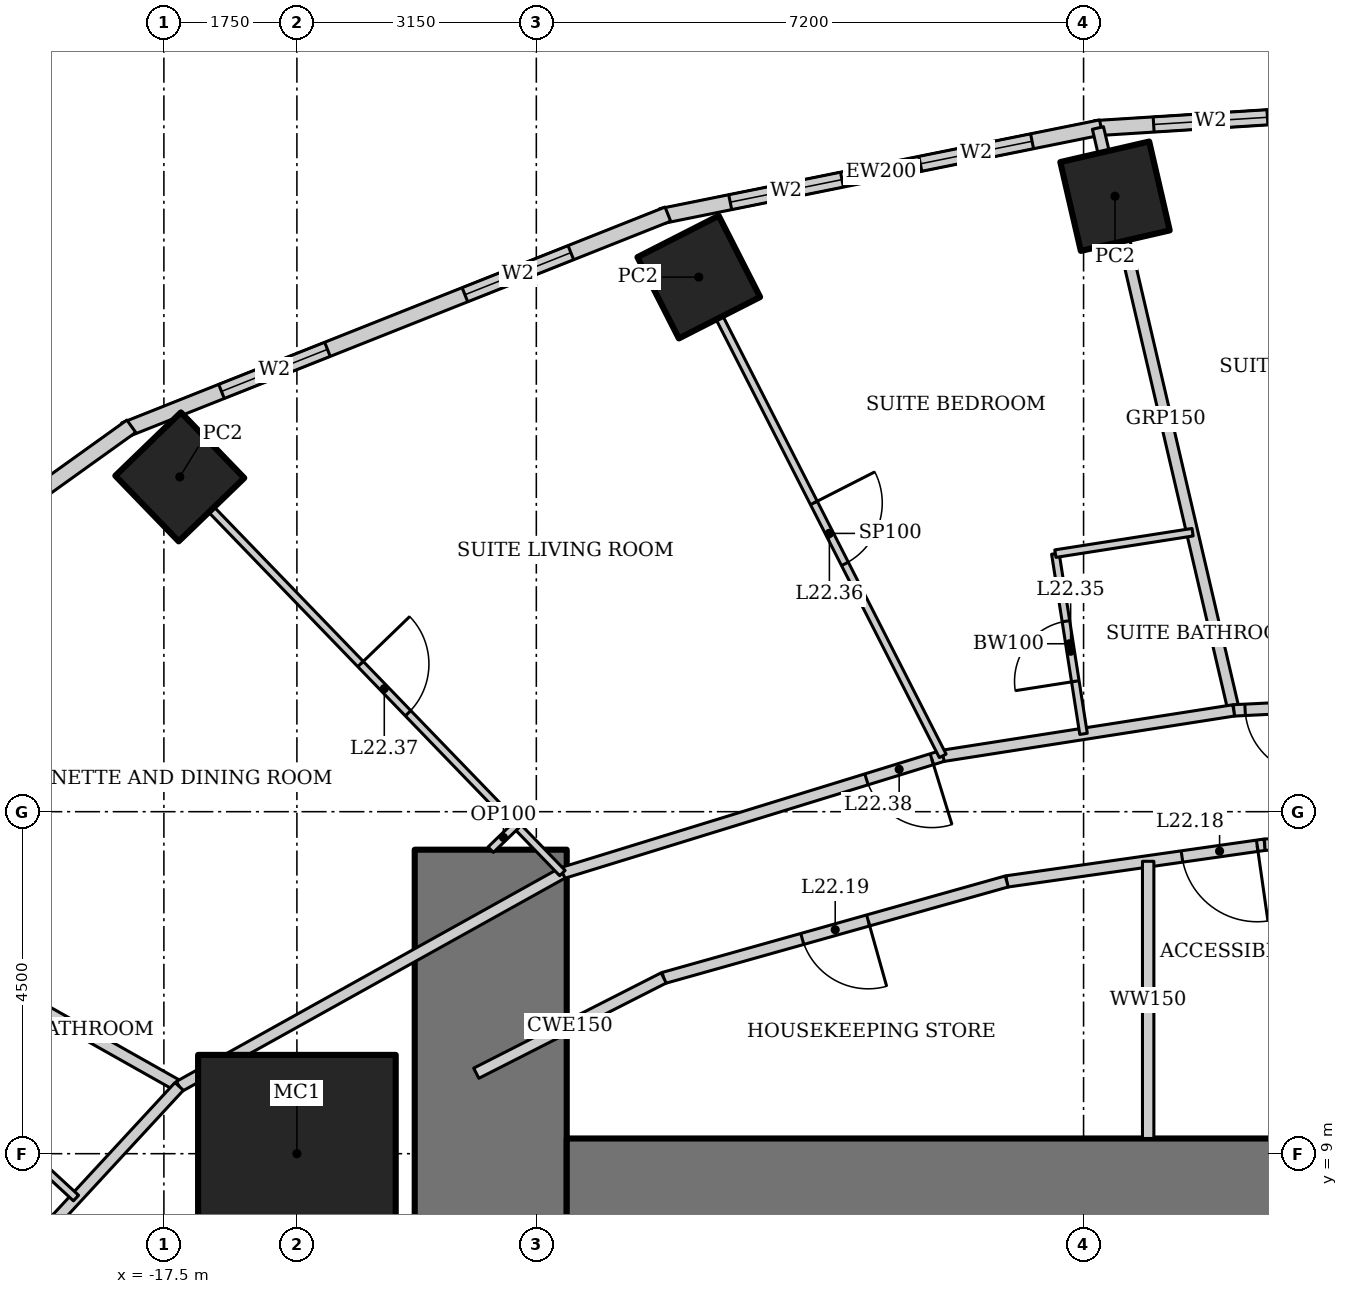
"""IFC4 building model, lengths in metres.
Left out: names, types, materials, properties, quantities, classifications, styles, units other than length and angle.
Written with IfcOpenShell. Run it as: python <this file> out.ifc"""

import sys

from ifc_helpers import new_model, si_unit, direction, frame, frame_2d, origin, origin_2d, place, context, subcontext, project, spatial, rectangle, hollow_rectangle, extrude, element, fill, save


model = new_model("IFC4")
c1 = context("Model", 3, precision=1e-05, world=origin(), true_north=direction((0.0, 1.0)))
c2 = subcontext(c1, "Body", "Model", "MODEL_VIEW")
j1 = project(units=[si_unit("LENGTHUNIT", "METRE"), si_unit("PLANEANGLEUNIT", "RADIAN")], contexts=[c1])
p1 = place(None, origin())
s1 = spatial("IfcSite", under=j1, at=p1, CompositionType="ELEMENT")
p2 = place(p1, origin())
s2 = spatial("IfcBuilding", under=s1, at=p2, CompositionType="ELEMENT")
p3 = place(p2, frame((0.0, 0.0, 94.6)))
s3 = spatial("IfcBuildingStorey", under=s2, at=p3, CompositionType="ELEMENT", Elevation=94.6)
p4 = place(p3, frame((-15.75, 9.0, 0.0), z_axis=(0.0, 0.0, 1.0), x_axis=(1.0, 0.0, 0.0)))
e1 = element("IfcColumn", 1, at=p4, inside=s3, PredefinedType="COLUMN", context=c2, shape_type="SweptSolid", body=[
    extrude(hollow_rectangle(XDim=2.6, YDim=2.6, WallThickness=0.13, at=origin_2d()), origin(), (0.0, 0.0, 1.0), 3.6),
])
for number, where, z_axis, x_axis in (
    (2, (-4.986, 21.598, 0.0), (0.0, 0.0, 1.0), (0.974, 0.225, 0.0)),
    (3, (-10.463, 20.534, 0.0), (0.0, 0.0, 1.0), (0.891, 0.454, 0.0)),
    (4, (-17.291, 17.905, 0.0), (0.0, 0.0, 1.0), (0.719, 0.695, 0.0)),
):
    element("IfcColumn", number, at=place(p3, frame(where, z_axis=z_axis, x_axis=x_axis)), inside=s3, PredefinedType="COLUMN", context=c2, shape_type="SweptSolid", body=[
        extrude(hollow_rectangle(XDim=1.2, YDim=1.2, WallThickness=0.1, at=origin_2d()), origin(), (0.0, 0.0, 1.0), 3.6),
    ])
p5 = place(p3, frame((-13.2, 13.0, 0.0), z_axis=(0.0, 0.0, 1.0), x_axis=(0.0, -1.0, 0.0)))
e5 = element("IfcWall", 5, at=p5, inside=s3, PredefinedType="SHEAR", context=c2, shape_type="SweptSolid", body=[
    extrude(rectangle(XDim=26.0, YDim=2.0, at=frame_2d((13.0, 0.0))), origin(), (0.0, 0.0, 1.0), 3.6),
])
p6 = place(p5, frame((12.1, 0.0, 0.0)))
e6 = element("IfcOpeningElement", 6, at=p6, cuts=e5, PredefinedType="OPENING", context=c2, shape_type="SweptSolid", body=[
    extrude(rectangle(XDim=1.8, YDim=2.1, at=frame_2d((0.9, 1.05))), frame((0.0, 1.01, 0.0), z_axis=(0.0, -1.0, 0.0), x_axis=(1.0, 0.0, 0.0)), (0.0, 0.0, 1.0), 2.02),
])
p7 = place(p3, frame((12.2, 8.0, 0.0), z_axis=(0.0, 0.0, 1.0), x_axis=(-1.0, 0.0, 0.0)))
e7 = element("IfcWall", 7, at=p7, inside=s3, PredefinedType="SHEAR", context=c2, shape_type="SweptSolid", body=[
    extrude(rectangle(XDim=24.4, YDim=2.4, at=frame_2d((12.2, 0.0))), origin(), (0.0, 0.0, 1.0), 3.6),
])
p8 = place(p3, frame((0.041, 22.827, 0.0), z_axis=(0.0, 0.0, 1.0), x_axis=(-0.998018582375, -0.062919863585, 0.0)))
e8 = element("IfcWall", 8, at=p8, inside=s3, PredefinedType="SOLIDWALL", context=c2, shape_type="SweptSolid", body=[
    extrude(rectangle(XDim=5.304, YDim=0.2, at=frame_2d((2.652, 0.0))), origin(), (0.0, 0.0, 1.0), 3.45),
])
p9 = place(p8, frame((0.776, 0.0, 0.5)))
e9 = element("IfcOpeningElement", 9, at=p9, cuts=e8, PredefinedType="OPENING", context=c2, shape_type="SweptSolid", body=[
    extrude(rectangle(XDim=1.5, YDim=2.2, at=frame_2d((0.75, 1.1))), frame((0.0, 0.11, 0.0), z_axis=(0.0, -1.0, 0.0), x_axis=(1.0, 0.0, 0.0)), (0.0, 0.0, 1.0), 0.22),
])
p10 = place(p8, frame((3.028, 0.0, 0.5)))
e10 = element("IfcOpeningElement", 10, at=p10, cuts=e8, PredefinedType="OPENING", context=c2, shape_type="SweptSolid", body=[
    extrude(rectangle(XDim=1.5, YDim=2.2, at=frame_2d((0.75, 1.1))), frame((0.0, 0.11, 0.0), z_axis=(0.0, -1.0, 0.0), x_axis=(1.0, 0.0, 0.0)), (0.0, 0.0, 1.0), 0.22),
])
p11 = place(p3, frame((-5.17, 22.504, 0.0), z_axis=(0.0, 0.0, 1.0), x_axis=(-0.980251657452, -0.197754110105, 0.0)))
e11 = element("IfcWall", 11, at=p11, inside=s3, PredefinedType="SOLIDWALL", context=c2, shape_type="SweptSolid", body=[
    extrude(rectangle(XDim=5.904, YDim=0.2, at=frame_2d((2.952, 0.0))), origin(), (0.0, 0.0, 1.0), 3.45),
])
p12 = place(p11, frame((0.926, 0.0, 0.5)))
e12 = element("IfcOpeningElement", 12, at=p12, cuts=e11, PredefinedType="OPENING", context=c2, shape_type="SweptSolid", body=[
    extrude(rectangle(XDim=1.5, YDim=2.2, at=frame_2d((0.75, 1.1))), frame((0.0, 0.11, 0.0), z_axis=(0.0, -1.0, 0.0), x_axis=(1.0, 0.0, 0.0)), (0.0, 0.0, 1.0), 0.22),
])
p13 = place(p11, frame((3.478, 0.0, 0.5)))
e13 = element("IfcOpeningElement", 13, at=p13, cuts=e11, PredefinedType="OPENING", context=c2, shape_type="SweptSolid", body=[
    extrude(rectangle(XDim=1.5, YDim=2.2, at=frame_2d((0.75, 1.1))), frame((0.0, 0.11, 0.0), z_axis=(0.0, -1.0, 0.0), x_axis=(1.0, 0.0, 0.0)), (0.0, 0.0, 1.0), 0.22),
])
p14 = place(p3, frame((-10.869, 21.363, 0.0), z_axis=(0.0, 0.0, 1.0), x_axis=(-0.929358351251, -0.369178892895, 0.0)))
e14 = element("IfcWall", 14, at=p14, inside=s3, PredefinedType="SOLIDWALL", context=c2, shape_type="SweptSolid", body=[
    extrude(rectangle(XDim=7.692, YDim=0.2, at=frame_2d((3.846, 0.0))), origin(), (0.0, 0.0, 1.0), 3.45),
])
p15 = place(p14, frame((1.373, 0.0, 0.5)))
e15 = element("IfcOpeningElement", 15, at=p15, cuts=e14, PredefinedType="OPENING", context=c2, shape_type="SweptSolid", body=[
    extrude(rectangle(XDim=1.5, YDim=2.2, at=frame_2d((0.75, 1.1))), frame((0.0, 0.11, 0.0), z_axis=(0.0, -1.0, 0.0), x_axis=(1.0, 0.0, 0.0)), (0.0, 0.0, 1.0), 0.22),
])
p16 = place(p14, frame((4.819, 0.0, 0.5)))
e16 = element("IfcOpeningElement", 16, at=p16, cuts=e14, PredefinedType="OPENING", context=c2, shape_type="SweptSolid", body=[
    extrude(rectangle(XDim=1.5, YDim=2.2, at=frame_2d((0.75, 1.1))), frame((0.0, 0.11, 0.0), z_axis=(0.0, -1.0, 0.0), x_axis=(1.0, 0.0, 0.0)), (0.0, 0.0, 1.0), 0.22),
])
p17 = place(p3, frame((-17.929, 18.572, 0.0), z_axis=(0.0, 0.0, 1.0), x_axis=(-0.812791321576, -0.582554948112, 0.0)))
e17 = element("IfcWall", 17, at=p17, inside=s3, PredefinedType="SOLIDWALL", context=c2, shape_type="SweptSolid", body=[
    extrude(rectangle(XDim=8.063, YDim=0.2, at=frame_2d((4.032, 0.0))), origin(), (0.0, 0.0, 1.0), 3.45),
])
p18 = place(p17, frame((1.466, 0.0, 0.5)))
e18 = element("IfcOpeningElement", 18, at=p18, cuts=e17, PredefinedType="OPENING", context=c2, shape_type="SweptSolid", body=[
    extrude(rectangle(XDim=1.5, YDim=2.2, at=frame_2d((0.75, 1.1))), frame((0.0, 0.11, 0.0), z_axis=(0.0, -1.0, 0.0), x_axis=(1.0, 0.0, 0.0)), (0.0, 0.0, 1.0), 0.22),
])
p19 = place(p17, frame((5.097, 0.0, 0.5)))
e19 = element("IfcOpeningElement", 19, at=p19, cuts=e17, PredefinedType="OPENING", context=c2, shape_type="SweptSolid", body=[
    extrude(rectangle(XDim=1.5, YDim=2.2, at=frame_2d((0.75, 1.1))), frame((0.0, 0.11, 0.0), z_axis=(0.0, -1.0, 0.0), x_axis=(1.0, 0.0, 0.0)), (0.0, 0.0, 1.0), 0.22),
])
p20 = place(p3, frame((-5.211, 22.496, 0.0), z_axis=(0.0, 0.0, 1.0), x_axis=(0.227056984461, -0.973881474209, 0.0)))
e20 = element("IfcWall", 20, at=p20, inside=s3, PredefinedType="PARTITIONING", context=c2, shape_type="SweptSolid", body=[
    extrude(rectangle(XDim=7.869, YDim=0.15, at=frame_2d((3.934, 0.0))), origin(), (0.0, 0.0, 1.0), 2.767),
])
p21 = place(p3, frame((-24.435, 13.909, 0.0), z_axis=(0.0, 0.0, 1.0), x_axis=(0.871075246657, -0.491149584813, 0.0)))
e21 = element("IfcWall", 21, at=p21, inside=s3, PredefinedType="PARTITIONING", context=c2, shape_type="SweptSolid", body=[
    extrude(rectangle(XDim=8.192, YDim=0.15, at=frame_2d((4.096, 0.0))), origin(), (0.0, 0.0, 1.0), 2.693),
])
p22 = place(p3, frame((0.0, 15.0, 0.0), z_axis=(0.0, 0.0, 1.0), x_axis=(-0.998809560203, -0.048779733975, 0.0)))
e22 = element("IfcWall", 22, at=p22, inside=s3, PredefinedType="PARTITIONING", context=c2, shape_type="SweptSolid", body=[
    extrude(rectangle(XDim=3.428, YDim=0.15, at=frame_2d((1.714, 0.0))), origin(), (0.0, 0.0, 1.0), 3.45),
])
p23 = place(p22, frame((2.378, 0.0, 0.0)))
e23 = element("IfcOpeningElement", 23, at=p23, cuts=e22, PredefinedType="OPENING", context=c2, shape_type="SweptSolid", body=[
    extrude(rectangle(XDim=0.9, YDim=2.1, at=frame_2d((0.45, 1.05))), frame((0.0, 0.085, 0.0), z_axis=(0.0, -1.0, 0.0), x_axis=(1.0, 0.0, 0.0)), (0.0, 0.0, 1.0), 0.17),
])
p24 = place(p3, frame((-3.424, 14.833, 0.0), z_axis=(0.0, 0.0, 1.0), x_axis=(-0.988015036573, -0.154357660987, 0.0)))
e24 = element("IfcWall", 24, at=p24, inside=s3, PredefinedType="PARTITIONING", context=c2, shape_type="SweptSolid", body=[
    extrude(rectangle(XDim=3.875, YDim=0.15, at=frame_2d((1.938, 0.0))), origin(), (0.0, 0.0, 1.0), 3.45),
])
p25 = place(p3, frame((-7.253, 14.235, 0.0), z_axis=(0.0, 0.0, 1.0), x_axis=(-0.955657956744, -0.294478980085, 0.0)))
e25 = element("IfcWall", 25, at=p25, inside=s3, PredefinedType="PARTITIONING", context=c2, shape_type="SweptSolid", body=[
    extrude(rectangle(XDim=5.236, YDim=0.15, at=frame_2d((2.618, 0.0))), origin(), (0.0, 0.0, 1.0), 3.45),
])
p26 = place(p25, frame((0.15, 0.0, 0.0)))
e26 = element("IfcOpeningElement", 26, at=p26, cuts=e25, PredefinedType="OPENING", context=c2, shape_type="SweptSolid", body=[
    extrude(rectangle(XDim=0.9, YDim=2.1, at=frame_2d((0.45, 1.05))), frame((0.0, 0.085, 0.0), z_axis=(0.0, -1.0, 0.0), x_axis=(1.0, 0.0, 0.0)), (0.0, 0.0, 1.0), 0.17),
])
p27 = place(p3, frame((-12.257, 12.693, 0.0), z_axis=(0.0, 0.0, 1.0), x_axis=(-0.873695910579, -0.486472461541, 0.0)))
e27 = element("IfcWall", 27, at=p27, inside=s3, PredefinedType="PARTITIONING", context=c2, shape_type="SweptSolid", body=[
    extrude(rectangle(XDim=5.771, YDim=0.15, at=frame_2d((2.885, 0.0))), origin(), (0.0, 0.0, 1.0), 3.45),
])
p28 = place(p3, frame((-17.299, 9.885, 0.0), z_axis=(0.0, 0.0, 1.0), x_axis=(-0.678641806296, -0.734469399463, 0.0)))
e28 = element("IfcWall", 28, at=p28, inside=s3, PredefinedType="PARTITIONING", context=c2, shape_type="SweptSolid", body=[
    extrude(rectangle(XDim=6.166, YDim=0.15, at=frame_2d((3.083, 0.0))), origin(), (0.0, 0.0, 1.0), 3.45),
])
p29 = place(p3, frame((-3.016, 13.066, 0.0), z_axis=(0.0, 0.0, 1.0), x_axis=(-0.990002114939, -0.14105251652, 0.0)))
e29 = element("IfcWall", 29, at=p29, inside=s3, PredefinedType="PARTITIONING", context=c2, shape_type="SweptSolid", body=[
    extrude(rectangle(XDim=3.429, YDim=0.15, at=frame_2d((1.714, 0.0))), origin(), (0.0, 0.0, 1.0), 3.45),
])
p30 = place(p29, frame((0.1, 0.0, 0.0)))
e30 = element("IfcOpeningElement", 30, at=p30, cuts=e29, PredefinedType="OPENING", context=c2, shape_type="SweptSolid", body=[
    extrude(rectangle(XDim=1.0, YDim=2.1, at=frame_2d((0.5, 1.05))), frame((0.0, 0.085, 0.0), z_axis=(0.0, -1.0, 0.0), x_axis=(1.0, 0.0, 0.0)), (0.0, 0.0, 1.0), 0.17),
])
p31 = place(p3, frame((-6.411, 12.582, 0.0), z_axis=(0.0, 0.0, 1.0), x_axis=(-0.962643729928, -0.270771211967, 0.0)))
e31 = element("IfcWall", 31, at=p31, inside=s3, PredefinedType="PARTITIONING", context=c2, shape_type="SweptSolid", body=[
    extrude(rectangle(XDim=4.688, YDim=0.15, at=frame_2d((2.344, 0.0))), origin(), (0.0, 0.0, 1.0), 3.45),
])
p32 = place(p31, frame((1.894, 0.0, 0.0)))
e32 = element("IfcOpeningElement", 32, at=p32, cuts=e31, PredefinedType="OPENING", context=c2, shape_type="SweptSolid", body=[
    extrude(rectangle(XDim=0.9, YDim=2.1, at=frame_2d((0.45, 1.05))), frame((0.0, 0.085, 0.0), z_axis=(0.0, -1.0, 0.0), x_axis=(1.0, 0.0, 0.0)), (0.0, 0.0, 1.0), 0.17),
])
p33 = place(p3, frame((-4.55, 9.2, 0.0), z_axis=(0.0, 0.0, 1.0), x_axis=(0.0, 1.0, 0.0)))
e33 = element("IfcWall", 33, at=p33, inside=s3, PredefinedType="SOLIDWALL", context=c2, shape_type="SweptSolid", body=[
    extrude(rectangle(XDim=3.647, YDim=0.15, at=frame_2d((1.824, 0.0))), origin(), (0.0, 0.0, 1.0), 3.45),
])
p34 = place(p3, frame((-5.4, 14.524, 0.0), z_axis=(0.0, 0.0, 1.0), x_axis=(-0.154426532979, 0.988004274238, 0.0)))
e34 = element("IfcWall", 34, at=p34, inside=s3, PredefinedType="PARTITIONING", context=c2, shape_type="SweptSolid", body=[
    extrude(rectangle(XDim=2.4, YDim=0.1, at=frame_2d((1.2, 0.0))), origin(), (0.0, 0.0, 1.0), 3.45),
])
p35 = place(p34, frame((0.7, 0.0, 0.0)))
e35 = element("IfcOpeningElement", 35, at=p35, cuts=e34, PredefinedType="OPENING", context=c2, shape_type="SweptSolid", body=[
    extrude(rectangle(XDim=0.8, YDim=2.1, at=frame_2d((0.4, 1.05))), frame((0.0, 0.06, 0.0), z_axis=(0.0, -1.0, 0.0), x_axis=(1.0, 0.0, 0.0)), (0.0, 0.0, 1.0), 0.12),
])
p36 = place(p3, frame((-5.771, 16.895, 0.0), z_axis=(0.0, 0.0, 1.0), x_axis=(0.98801840204, 0.154336117711, 0.0)))
e36 = element("IfcWall", 36, at=p36, inside=s3, PredefinedType="PARTITIONING", context=c2, shape_type="SweptSolid", body=[
    extrude(rectangle(XDim=1.827, YDim=0.1, at=frame_2d((0.914, 0.0))), origin(), (0.0, 0.0, 1.0), 3.45),
])
p37 = place(p3, frame((-10.236, 20.088, 0.0), z_axis=(0.0, 0.0, 1.0), x_axis=(0.453993694696, -0.89100489627, 0.0)))
e37 = element("IfcWall", 37, at=p37, inside=s3, PredefinedType="PARTITIONING", context=c2, shape_type="SweptSolid", body=[
    extrude(rectangle(XDim=6.57, YDim=0.1, at=frame_2d((3.285, 0.0))), origin(), (0.0, 0.0, 1.0), 2.528),
])
p38 = place(p37, frame((2.835, 0.0, 0.0)))
e38 = element("IfcOpeningElement", 38, at=p38, cuts=e37, PredefinedType="OPENING", context=c2, shape_type="SweptSolid", body=[
    extrude(rectangle(XDim=0.9, YDim=2.1, at=frame_2d((0.45, 1.05))), frame((0.0, 0.06, 0.0), z_axis=(0.0, -1.0, 0.0), x_axis=(1.0, 0.0, 0.0)), (0.0, 0.0, 1.0), 0.12),
])
p39 = place(p3, frame((-16.944, 17.545, 0.0), z_axis=(0.0, 0.0, 1.0), x_axis=(0.694677175107, -0.719321640426, 0.0)))
e39 = element("IfcWall", 39, at=p39, inside=s3, PredefinedType="PARTITIONING", context=c2, shape_type="SweptSolid", body=[
    extrude(rectangle(XDim=6.746, YDim=0.1, at=frame_2d((3.373, 0.0))), origin(), (0.0, 0.0, 1.0), 2.528),
])
p40 = place(p39, frame((2.923, 0.0, 0.0)))
e40 = element("IfcOpeningElement", 40, at=p40, cuts=e39, PredefinedType="OPENING", context=c2, shape_type="SweptSolid", body=[
    extrude(rectangle(XDim=0.9, YDim=2.1, at=frame_2d((0.45, 1.05))), frame((0.0, 0.06, 0.0), z_axis=(0.0, -1.0, 0.0), x_axis=(1.0, 0.0, 0.0)), (0.0, 0.0, 1.0), 0.12),
])
p41 = place(p3, frame((-18.656, 8.416, 0.0), z_axis=(0.0, 0.0, 1.0), x_axis=(-0.73447964986, 0.678630712495, 0.0)))
e41 = element("IfcWall", 41, at=p41, inside=s3, PredefinedType="PARTITIONING", context=c2, shape_type="SweptSolid", body=[
    extrude(rectangle(XDim=2.4, YDim=0.1, at=frame_2d((1.2, 0.0))), origin(), (0.0, 0.0, 1.0), 3.45),
])
p42 = place(p41, frame((0.7, 0.0, 0.0)))
e42 = element("IfcOpeningElement", 42, at=p42, cuts=e41, PredefinedType="OPENING", context=c2, shape_type="SweptSolid", body=[
    extrude(rectangle(XDim=0.8, YDim=2.1, at=frame_2d((0.4, 1.05))), frame((0.0, 0.06, 0.0), z_axis=(0.0, -1.0, 0.0), x_axis=(1.0, 0.0, 0.0)), (0.0, 0.0, 1.0), 0.12),
])
p43 = place(p3, frame((-13.2, 13.0, 0.0), z_axis=(0.0, 0.0, 1.0), x_axis=(0.719347134512, 0.69465077562, 0.0)))
e43 = element("IfcWall", 43, at=p43, inside=s3, PredefinedType="PARTITIONING", context=c2, shape_type="SweptSolid", body=[
    extrude(rectangle(XDim=0.465, YDim=0.1, at=frame_2d((0.232, 0.0))), origin(), (0.0, 0.0, 1.0), 3.45),
])
p44 = place(p3, frame((-10.924, 11.312, 0.0), z_axis=(0.0, 0.0, 1.0), x_axis=(-0.891388152271, -0.453240732935, 0.0)))
e44 = element("IfcWall", 44, at=p44, inside=s3, PredefinedType="PARTITIONING", context=c2, shape_type="SweptSolid", body=[
    extrude(rectangle(XDim=2.766, YDim=0.15, at=frame_2d((1.383, 0.0))), origin(), (0.0, 0.0, 1.0), 3.45),
])
p45 = place(p3, frame((-2.035, 13.109, 0.0), z_axis=(0.0, 0.0, 1.0), x_axis=(-0.999010128674, -0.044483286824, 0.0)))
e45 = element("IfcWall", 45, at=p45, inside=s3, PredefinedType="PARTITIONING", context=c2, shape_type="SweptSolid", body=[
    extrude(rectangle(XDim=0.982, YDim=0.15, at=frame_2d((0.491, 0.0))), origin(), (0.0, 0.0, 1.0), 3.45),
])
p46 = place(p10, origin())
e46 = element("IfcWindow", 46, at=p46, inside=s3, PartitioningType="SINGLE_PANEL", PredefinedType="WINDOW", context=c2, shape_type="SweptSolid", body=[
    extrude(rectangle(XDim=1.5, YDim=2.2, at=frame_2d((0.75, 1.1))), frame((0.0, 0.03, 0.0), z_axis=(0.0, -1.0, 0.0), x_axis=(1.0, 0.0, 0.0)), (0.0, 0.0, 1.0), 0.06),
])
fill(e10, e46)
p47 = place(p12, origin())
e47 = element("IfcWindow", 47, at=p47, inside=s3, PartitioningType="SINGLE_PANEL", PredefinedType="WINDOW", context=c2, shape_type="SweptSolid", body=[
    extrude(rectangle(XDim=1.5, YDim=2.2, at=frame_2d((0.75, 1.1))), frame((0.0, 0.03, 0.0), z_axis=(0.0, -1.0, 0.0), x_axis=(1.0, 0.0, 0.0)), (0.0, 0.0, 1.0), 0.06),
])
fill(e12, e47)
p48 = place(p13, origin())
e48 = element("IfcWindow", 48, at=p48, inside=s3, PartitioningType="SINGLE_PANEL", PredefinedType="WINDOW", context=c2, shape_type="SweptSolid", body=[
    extrude(rectangle(XDim=1.5, YDim=2.2, at=frame_2d((0.75, 1.1))), frame((0.0, 0.03, 0.0), z_axis=(0.0, -1.0, 0.0), x_axis=(1.0, 0.0, 0.0)), (0.0, 0.0, 1.0), 0.06),
])
fill(e13, e48)
p49 = place(p15, origin())
e49 = element("IfcWindow", 49, at=p49, inside=s3, PartitioningType="SINGLE_PANEL", PredefinedType="WINDOW", context=c2, shape_type="SweptSolid", body=[
    extrude(rectangle(XDim=1.5, YDim=2.2, at=frame_2d((0.75, 1.1))), frame((0.0, 0.03, 0.0), z_axis=(0.0, -1.0, 0.0), x_axis=(1.0, 0.0, 0.0)), (0.0, 0.0, 1.0), 0.06),
])
fill(e15, e49)
p50 = place(p16, origin())
e50 = element("IfcWindow", 50, at=p50, inside=s3, PartitioningType="SINGLE_PANEL", PredefinedType="WINDOW", context=c2, shape_type="SweptSolid", body=[
    extrude(rectangle(XDim=1.5, YDim=2.2, at=frame_2d((0.75, 1.1))), frame((0.0, 0.03, 0.0), z_axis=(0.0, -1.0, 0.0), x_axis=(1.0, 0.0, 0.0)), (0.0, 0.0, 1.0), 0.06),
])
fill(e16, e50)
p51 = place(p30, origin())
e51 = element("IfcDoor", 51, at=p51, inside=s3, OperationType="SINGLE_SWING_LEFT", PredefinedType="DOOR", context=c2, shape_type="SweptSolid", body=[
    extrude(rectangle(XDim=1.0, YDim=2.1, at=frame_2d((0.5, 1.05))), frame((0.0, 0.025, 0.0), z_axis=(0.0, -1.0, 0.0), x_axis=(1.0, 0.0, 0.0)), (0.0, 0.0, 1.0), 0.05),
])
fill(e30, e51)
p52 = place(p32, origin())
e52 = element("IfcDoor", 52, at=p52, inside=s3, OperationType="SINGLE_SWING_LEFT", PredefinedType="DOOR", context=c2, shape_type="SweptSolid", body=[
    extrude(rectangle(XDim=0.9, YDim=2.1, at=frame_2d((0.45, 1.05))), frame((0.0, 0.025, 0.0), z_axis=(0.0, -1.0, 0.0), x_axis=(1.0, 0.0, 0.0)), (0.0, 0.0, 1.0), 0.05),
])
fill(e32, e52)
p53 = place(p23, origin())
e53 = element("IfcDoor", 53, at=p53, inside=s3, OperationType="SINGLE_SWING_LEFT", PredefinedType="DOOR", context=c2, shape_type="SweptSolid", body=[
    extrude(rectangle(XDim=0.9, YDim=2.1, at=frame_2d((0.45, 1.05))), frame((0.0, 0.025, 0.0), z_axis=(0.0, -1.0, 0.0), x_axis=(1.0, 0.0, 0.0)), (0.0, 0.0, 1.0), 0.05),
])
fill(e23, e53)
p54 = place(p35, origin())
e54 = element("IfcDoor", 54, at=p54, inside=s3, OperationType="SINGLE_SWING_LEFT", PredefinedType="DOOR", context=c2, shape_type="SweptSolid", body=[
    extrude(rectangle(XDim=0.8, YDim=2.1, at=frame_2d((0.4, 1.05))), frame((0.0, 0.025, 0.0), z_axis=(0.0, -1.0, 0.0), x_axis=(1.0, 0.0, 0.0)), (0.0, 0.0, 1.0), 0.05),
])
fill(e35, e54)
p55 = place(p38, origin())
e55 = element("IfcDoor", 55, at=p55, inside=s3, OperationType="SINGLE_SWING_LEFT", PredefinedType="DOOR", context=c2, shape_type="SweptSolid", body=[
    extrude(rectangle(XDim=0.9, YDim=2.1, at=frame_2d((0.45, 1.05))), frame((0.0, 0.025, 0.0), z_axis=(0.0, -1.0, 0.0), x_axis=(1.0, 0.0, 0.0)), (0.0, 0.0, 1.0), 0.05),
])
fill(e38, e55)
p56 = place(p40, origin())
e56 = element("IfcDoor", 56, at=p56, inside=s3, OperationType="SINGLE_SWING_LEFT", PredefinedType="DOOR", context=c2, shape_type="SweptSolid", body=[
    extrude(rectangle(XDim=0.9, YDim=2.1, at=frame_2d((0.45, 1.05))), frame((0.0, 0.025, 0.0), z_axis=(0.0, -1.0, 0.0), x_axis=(1.0, 0.0, 0.0)), (0.0, 0.0, 1.0), 0.05),
])
fill(e40, e56)
p57 = place(p26, origin())
e57 = element("IfcDoor", 57, at=p57, inside=s3, OperationType="SINGLE_SWING_LEFT", PredefinedType="DOOR", context=c2, shape_type="SweptSolid", body=[
    extrude(rectangle(XDim=0.9, YDim=2.1, at=frame_2d((0.45, 1.05))), frame((0.0, 0.025, 0.0), z_axis=(0.0, -1.0, 0.0), x_axis=(1.0, 0.0, 0.0)), (0.0, 0.0, 1.0), 0.05),
])
fill(e26, e57)
save(model, sys.argv[1])
